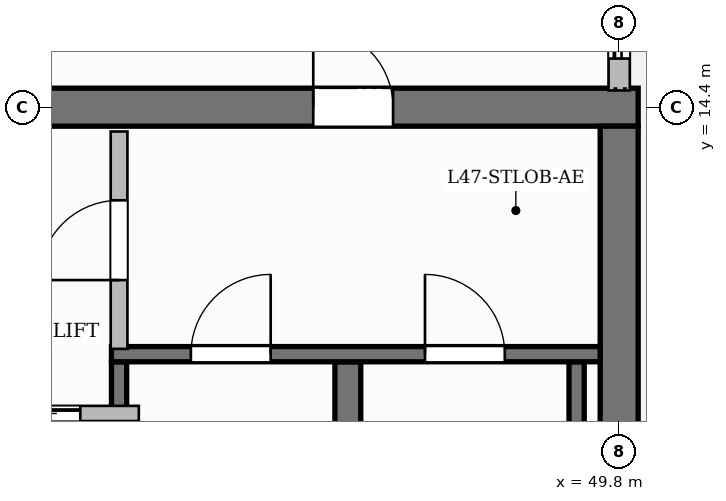
"""IFC4 building model, lengths in metres.
Left out: names, types, materials, properties, quantities, classifications, styles, units other than length and angle.
Written with IfcOpenShell. Run it as: python <this file> out.ifc"""

import sys

from ifc_helpers import new_model, si_unit, direction, frame, frame_2d, origin, place, context, subcontext, project, spatial, rectangle, extrude, source, transform, mapped, element, fill, save


model = new_model("IFC4")
c1 = context("Model", 3, precision=1e-05, world=origin(), true_north=direction((0.0, 1.0)))
c2 = subcontext(c1, "Body", "Model", "MODEL_VIEW")
j1 = project(units=[si_unit("LENGTHUNIT", "METRE"), si_unit("PLANEANGLEUNIT", "RADIAN")], contexts=[c1])
p1 = place(None, origin())
s1 = spatial("IfcSite", under=j1, at=p1, CompositionType="ELEMENT")
p2 = place(p1, origin())
s2 = spatial("IfcBuilding", under=s1, at=p2, CompositionType="ELEMENT")
p3 = place(p2, frame((0.0, 0.0, 188.8)))
s3 = spatial("IfcBuildingStorey", under=s2, at=p3, CompositionType="ELEMENT", Elevation=188.8)
p4 = place(p3, frame((34.55, 14.4, 0.0), z_axis=(0.0, 0.0, 1.0), x_axis=(1.0, 0.0, 0.0)))
e1 = element("IfcWall", 1, at=p4, inside=s3, PredefinedType="SHEAR", context=c2, shape_type="SweptSolid", body=[
    extrude(rectangle(XDim=15.5, YDim=0.5, at=frame_2d((7.75, 0.0))), origin(), (0.0, 0.0, 1.0), 3.85),
])
p5 = place(p4, frame((5.38, 0.0, 0.0)))
e2 = element("IfcOpeningElement", 2, at=p5, cuts=e1, PredefinedType="OPENING", context=c2, shape_type="SweptSolid", body=[
    extrude(rectangle(XDim=1.5, YDim=2.2, at=frame_2d((0.75, 1.1))), frame((0.0, 0.26, 0.0), z_axis=(0.0, -1.0, 0.0), x_axis=(1.0, 0.0, 0.0)), (0.0, 0.0, 1.0), 0.52),
])
p6 = place(p4, frame((1.595, 0.0, 0.0)))
e3 = element("IfcOpeningElement", 3, at=p6, cuts=e1, PredefinedType="OPENING", context=c2, shape_type="SweptSolid", body=[
    extrude(rectangle(XDim=1.05, YDim=2.15, at=frame_2d((0.525, 1.075))), frame((0.0, 0.26, 0.0), z_axis=(0.0, -1.0, 0.0), x_axis=(1.0, 0.0, 0.0)), (0.0, 0.0, 1.0), 0.52),
])
p7 = place(p4, frame((11.225, 0.0, 0.0)))
e4 = element("IfcOpeningElement", 4, at=p7, cuts=e1, PredefinedType="OPENING", context=c2, shape_type="SweptSolid", body=[
    extrude(rectangle(XDim=1.05, YDim=2.15, at=frame_2d((0.525, 1.075))), frame((0.0, 0.26, 0.0), z_axis=(0.0, -1.0, 0.0), x_axis=(1.0, 0.0, 0.0)), (0.0, 0.0, 1.0), 0.52),
])
p8 = place(p3, frame((49.8, 3.85, 0.0), z_axis=(0.0, 0.0, 1.0), x_axis=(0.0, 1.0, 0.0)))
e5 = element("IfcWall", 5, at=p8, inside=s3, PredefinedType="SHEAR", context=c2, shape_type="SweptSolid", body=[
    extrude(rectangle(XDim=10.3, YDim=0.5, at=frame_2d((5.15, 0.0))), origin(), (0.0, 0.0, 1.0), 3.85),
])
p9 = place(p3, frame((43.22, 4.1, 0.0), z_axis=(0.0, 0.0, 1.0), x_axis=(0.0, 1.0, 0.0)))
e6 = element("IfcWall", 6, at=p9, inside=s3, PredefinedType="SHEAR", context=c2, shape_type="SweptSolid", body=[
    extrude(rectangle(XDim=6.95, YDim=0.2, at=frame_2d((3.475, 0.0))), origin(), (0.0, 0.0, 1.0), 3.85),
])
p10 = place(p3, frame((46.23, 4.1, 0.0), z_axis=(0.0, 0.0, 1.0), x_axis=(0.0, 1.0, 0.0)))
e7 = element("IfcWall", 7, at=p10, inside=s3, PredefinedType="SHEAR", context=c2, shape_type="SweptSolid", body=[
    extrude(rectangle(XDim=6.95, YDim=0.34, at=frame_2d((3.475, 0.0))), origin(), (0.0, 0.0, 1.0), 3.85),
])
p11 = place(p3, frame((49.24, 4.1, 0.0), z_axis=(0.0, 0.0, 1.0), x_axis=(0.0, 1.0, 0.0)))
e8 = element("IfcWall", 8, at=p11, inside=s3, PredefinedType="SHEAR", context=c2, shape_type="SweptSolid", body=[
    extrude(rectangle(XDim=6.95, YDim=0.2, at=frame_2d((3.475, 0.0))), origin(), (0.0, 0.0, 1.0), 3.85),
])
p12 = place(p3, frame((43.12, 11.15, 0.0), z_axis=(0.0, 0.0, 1.0), x_axis=(1.0, 0.0, 0.0)))
e9 = element("IfcWall", 9, at=p12, inside=s3, PredefinedType="SHEAR", context=c2, shape_type="SweptSolid", body=[
    extrude(rectangle(XDim=6.43, YDim=0.2, at=frame_2d((3.215, 0.0))), origin(), (0.0, 0.0, 1.0), 3.85),
])
p13 = place(p12, frame((1.045, 0.0, 0.0)))
e10 = element("IfcOpeningElement", 10, at=p13, cuts=e9, PredefinedType="OPENING", context=c2, shape_type="SweptSolid", body=[
    extrude(rectangle(XDim=1.05, YDim=2.2, at=frame_2d((0.525, 1.1))), frame((0.0, 0.11, 0.0), z_axis=(0.0, -1.0, 0.0), x_axis=(1.0, 0.0, 0.0)), (0.0, 0.0, 1.0), 0.22),
])
p14 = place(p12, frame((4.125, 0.0, 0.0)))
e11 = element("IfcOpeningElement", 11, at=p14, cuts=e9, PredefinedType="OPENING", context=c2, shape_type="SweptSolid", body=[
    extrude(rectangle(XDim=1.05, YDim=2.2, at=frame_2d((0.525, 1.1))), frame((0.0, 0.11, 0.0), z_axis=(0.0, -1.0, 0.0), x_axis=(1.0, 0.0, 0.0)), (0.0, 0.0, 1.0), 0.22),
])
p15 = place(p3, frame((43.22, 11.22, 0.0), z_axis=(0.0, 0.0, 1.0), x_axis=(0.0, 1.0, 0.0)))
e12 = element("IfcWall", 12, at=p15, inside=s3, PredefinedType="PARTITIONING", context=c2, shape_type="SweptSolid", body=[
    extrude(rectangle(XDim=2.86, YDim=0.22, at=frame_2d((1.43, 0.0))), origin(), (0.0, 0.0, 1.0), 3.6),
])
p16 = place(p15, frame((0.905, 0.0, 0.0)))
e13 = element("IfcOpeningElement", 13, at=p16, cuts=e12, PredefinedType="OPENING", context=c2, shape_type="SweptSolid", body=[
    extrude(rectangle(XDim=1.05, YDim=2.15, at=frame_2d((0.525, 1.075))), frame((0.0, 0.12, 0.0), z_axis=(0.0, -1.0, 0.0), x_axis=(1.0, 0.0, 0.0)), (0.0, 0.0, 1.0), 0.24),
])
p17 = place(p3, frame((40.84, 10.37, 0.0), z_axis=(0.0, 0.0, 1.0), x_axis=(1.0, 0.0, 0.0)))
e14 = element("IfcWall", 14, at=p17, inside=s3, PredefinedType="PARTITIONING", context=c2, shape_type="SweptSolid", body=[
    extrude(rectangle(XDim=2.64, YDim=0.2, at=frame_2d((1.32, 0.0))), origin(), (0.0, 0.0, 1.0), 3.6),
])
p18 = place(p17, frame((0.77, 0.0, 0.0)))
e15 = element("IfcOpeningElement", 15, at=p18, cuts=e14, PredefinedType="OPENING", context=c2, shape_type="SweptSolid", body=[
    extrude(rectangle(XDim=1.1, YDim=2.2, at=frame_2d((0.55, 1.1))), frame((0.0, 0.11, 0.0), z_axis=(0.0, -1.0, 0.0), x_axis=(1.0, 0.0, 0.0)), (0.0, 0.0, 1.0), 0.22),
])
p19 = place(p3, frame((49.8, 14.62, 0.0), z_axis=(0.0, 0.0, 1.0), x_axis=(0.0, 1.0, 0.0)))
e16 = element("IfcWall", 16, at=p19, inside=s3, PredefinedType="SOLIDWALL", context=c2, shape_type="SweptSolid", body=[
    extrude(rectangle(XDim=6.93, YDim=0.28, at=frame_2d((3.465, 0.0))), origin(), (0.0, 0.0, 1.0), 3.085),
])
p20 = place(p19, frame((0.42, 0.0, 0.0)))
e17 = element("IfcOpeningElement", 17, at=p20, cuts=e16, PredefinedType="OPENING", context=c2, shape_type="SweptSolid", body=[
    extrude(rectangle(XDim=1.2, YDim=2.2, at=frame_2d((0.6, 1.1))), frame((0.0, 0.15, 0.0), z_axis=(0.0, -1.0, 0.0), x_axis=(1.0, 0.0, 0.0)), (0.0, 0.0, 1.0), 0.3),
])
p21 = place(p19, frame((3.659, 0.0, 0.8)))
e18 = element("IfcOpeningElement", 18, at=p21, cuts=e16, PredefinedType="OPENING", context=c2, shape_type="SweptSolid", body=[
    extrude(rectangle(XDim=1.8, YDim=1.85, at=frame_2d((0.9, 0.925))), frame((0.0, 0.15, 0.0), z_axis=(0.0, -1.0, 0.0), x_axis=(1.0, 0.0, 0.0)), (0.0, 0.0, 1.0), 0.3),
])
m1 = source(origin(), c2, "Body", "SweptSolid", [
    extrude(rectangle(XDim=1.05, YDim=2.2, at=frame_2d((0.525, 1.1))), frame((0.0, 0.025, 0.0), z_axis=(0.0, -1.0, 0.0), x_axis=(1.0, 0.0, 0.0)), (0.0, 0.0, 1.0), 0.05),
])
p22 = place(p13, origin())
e19 = element("IfcDoor", 19, at=p22, inside=s3, OperationType="SINGLE_SWING_RIGHT", PredefinedType="DOOR", context=c2, shape_type="MappedRepresentation", body=[
    mapped(m1, transform((0.0, 0.0, 0.0), scale=1.0)),
])
fill(e10, e19)
p23 = place(p14, origin())
e20 = element("IfcDoor", 20, at=p23, inside=s3, OperationType="SINGLE_SWING_LEFT", PredefinedType="DOOR", context=c2, shape_type="MappedRepresentation", body=[
    mapped(m1, transform((0.0, 0.0, 0.0), scale=1.0)),
])
fill(e11, e20)
m2 = source(origin(), c2, "Body", "SweptSolid", [
    extrude(rectangle(XDim=1.05, YDim=2.15, at=frame_2d((0.525, 1.075))), frame((0.0, 0.025, 0.0), z_axis=(0.0, -1.0, 0.0), x_axis=(1.0, 0.0, 0.0)), (0.0, 0.0, 1.0), 0.05),
])
p24 = place(p16, origin())
e21 = element("IfcDoor", 21, at=p24, inside=s3, OperationType="SINGLE_SWING_LEFT", PredefinedType="DOOR", context=c2, shape_type="MappedRepresentation", body=[
    mapped(m2, transform((0.0, 0.0, 0.0), scale=1.0)),
])
fill(e13, e21)
p25 = place(p7, origin())
e22 = element("IfcDoor", 22, at=p25, inside=s3, OperationType="SINGLE_SWING_LEFT", PredefinedType="DOOR", context=c2, shape_type="MappedRepresentation", body=[
    mapped(m2, transform((0.0, 0.0, 0.0), scale=1.0)),
])
fill(e4, e22)
m3 = source(origin(), c2, "Body", "SweptSolid", [
    extrude(rectangle(XDim=1.1, YDim=2.2, at=frame_2d((0.55, 1.1))), frame((0.0, 0.025, 0.0), z_axis=(0.0, -1.0, 0.0), x_axis=(1.0, 0.0, 0.0)), (0.0, 0.0, 1.0), 0.05),
])
p26 = place(p18, origin())
e23 = element("IfcDoor", 23, at=p26, inside=s3, OperationType="SLIDING_TO_LEFT", PredefinedType="DOOR", context=c2, shape_type="MappedRepresentation", body=[
    mapped(m3, transform((0.0, 0.0, 0.0), scale=1.0)),
])
fill(e15, e23)
m4 = source(origin(), c2, "Body", "SweptSolid", [
    extrude(rectangle(XDim=1.2, YDim=2.2, at=frame_2d((0.6, 1.1))), frame((0.0, 0.025, 0.0), z_axis=(0.0, -1.0, 0.0), x_axis=(1.0, 0.0, 0.0)), (0.0, 0.0, 1.0), 0.05),
])
p27 = place(p20, origin())
e24 = element("IfcDoor", 24, at=p27, inside=s3, OperationType="SLIDING_TO_LEFT", PredefinedType="DOOR", context=c2, shape_type="MappedRepresentation", body=[
    mapped(m4, transform((0.0, 0.0, 0.0), scale=1.0)),
])
fill(e17, e24)
save(model, sys.argv[1])
